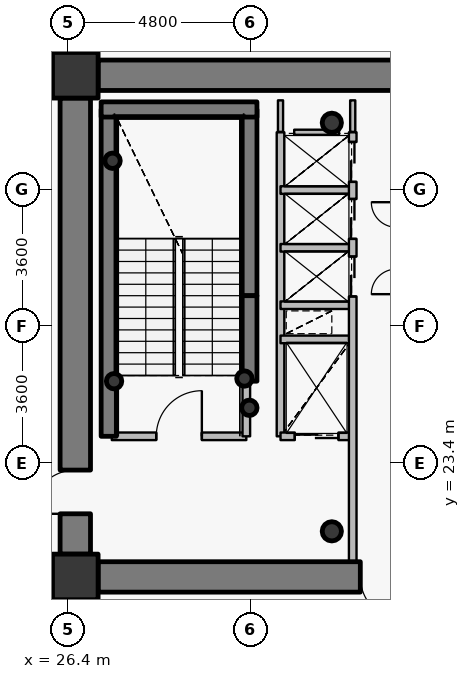
"""IFC4 building model, lengths in metres.
Left out: names, types, materials, properties, quantities, classifications, styles, units other than length and angle.
Written with IfcOpenShell. Run it as: python <this file> out.ifc"""

import sys

from ifc_helpers import new_model, si_unit, direction, frame, frame_2d, origin, origin_2d, place, context, subcontext, project, spatial, rectangle, hollow_circle, extrude, source, transform, mapped, element, fill, save


model = new_model("IFC4")
c1 = context("Model", 3, precision=1e-05, world=origin(), true_north=direction((0.0, 1.0)))
c2 = subcontext(c1, "Body", "Model", "MODEL_VIEW")
j1 = project(units=[si_unit("LENGTHUNIT", "METRE"), si_unit("PLANEANGLEUNIT", "RADIAN")], contexts=[c1])
p1 = place(None, origin())
s1 = spatial("IfcSite", under=j1, at=p1, CompositionType="ELEMENT")
p2 = place(p1, origin())
s2 = spatial("IfcBuilding", under=s1, at=p2, CompositionType="ELEMENT")
p3 = place(p2, frame((0.0, 0.0, 182.4)))
s3 = spatial("IfcBuildingStorey", under=s2, at=p3, CompositionType="ELEMENT", Elevation=182.4)
for number, where, z_axis, x_axis in (
    (1, (26.6, 20.4, 0.0), (0.0, 0.0, 1.0), (1.0, 0.0, 0.0)),
    (2, (26.6, 33.6, 0.0), (0.0, 0.0, 1.0), (1.0, 0.0, 0.0)),
):
    element("IfcColumn", number, at=place(p3, frame(where, z_axis=z_axis, x_axis=x_axis)), inside=s3, PredefinedType="COLUMN", context=c2, shape_type="SweptSolid", body=[
        extrude(rectangle(XDim=1.2, YDim=1.2, at=origin_2d()), origin(), (0.0, 0.0, 1.0), 3.75),
    ])
for number, where, z_axis, x_axis in (
    (3, (33.35, 21.6, 0.0), (0.0, 0.0, 1.0), (1.0, 0.0, 0.0)),
    (4, (33.35, 32.35, 0.0), (0.0, 0.0, 1.0), (1.0, 0.0, 0.0)),
):
    element("IfcColumn", number, at=place(p3, frame(where, z_axis=z_axis, x_axis=x_axis)), inside=s3, PredefinedType="COLUMN", context=c2, shape_type="SweptSolid", body=[
        extrude(hollow_circle(Radius=0.254, WallThickness=0.02, at=origin_2d()), origin(), (0.0, 0.0, 1.0), 3.75),
    ])
p4 = place(p3, frame((27.48, 24.1, 0.0), z_axis=(0.0, 0.0, 1.0), x_axis=(0.0, 1.0, 0.0)))
e5 = element("IfcWall", 5, at=p4, inside=s3, PredefinedType="SHEAR", context=c2, shape_type="SweptSolid", body=[
    extrude(rectangle(XDim=8.6, YDim=0.4, at=frame_2d((4.3, 0.0))), origin(), (0.0, 0.0, 1.0), 3.75),
])
p5 = place(p3, frame((31.18, 27.8, 0.0), z_axis=(0.0, 0.0, 1.0), x_axis=(0.0, 1.0, 0.0)))
e6 = element("IfcWall", 6, at=p5, inside=s3, PredefinedType="SHEAR", context=c2, shape_type="SweptSolid", body=[
    extrude(rectangle(XDim=4.9, YDim=0.4, at=frame_2d((2.45, 0.0))), origin(), (0.0, 0.0, 1.0), 3.75),
])
p6 = place(p3, frame((27.28, 32.7, 0.0), z_axis=(0.0, 0.0, 1.0), x_axis=(1.0, 0.0, 0.0)))
e7 = element("IfcWall", 7, at=p6, inside=s3, PredefinedType="SHEAR", context=c2, shape_type="SweptSolid", body=[
    extrude(rectangle(XDim=4.1, YDim=0.4, at=frame_2d((2.05, 0.0))), origin(), (0.0, 0.0, 1.0), 3.75),
])
for number, where, z_axis, x_axis in (
    (8, (27.58, 31.35, 0.0), (0.0, 0.0, 1.0), (1.0, 0.0, 0.0)),
    (9, (31.05, 25.62, 0.0), (0.0, 0.0, 1.0), (1.0, 0.0, 0.0)),
    (10, (31.18, 24.85, 0.0), (0.0, 0.0, 1.0), (1.0, 0.0, 0.0)),
    (11, (27.62, 25.55, 0.0), (0.0, 0.0, 1.0), (1.0, 0.0, 0.0)),
):
    element("IfcColumn", number, at=place(p3, frame(where, z_axis=z_axis, x_axis=x_axis)), inside=s3, PredefinedType="COLUMN", context=c2, shape_type="SweptSolid", body=[
        extrude(hollow_circle(Radius=0.203, WallThickness=0.016, at=origin_2d()), origin(), (0.0, 0.0, 1.0), 3.75),
    ])
p7 = place(p3, frame((27.2, 33.6, 0.0), z_axis=(0.0, 0.0, 1.0), x_axis=(1.0, 0.0, 0.0)))
e12 = element("IfcWall", 12, at=p7, inside=s3, PredefinedType="SHEAR", context=c2, shape_type="SweptSolid", body=[
    extrude(rectangle(XDim=17.6, YDim=0.8, at=frame_2d((8.8, 0.0))), origin(), (0.0, 0.0, 1.0), 2.95),
])
p8 = place(p7, frame((13.45, 0.0, 0.0)))
e13 = element("IfcOpeningElement", 13, at=p8, cuts=e12, PredefinedType="OPENING", context=c2, shape_type="SweptSolid", body=[
    extrude(rectangle(XDim=1.15, YDim=2.15, at=origin_2d()), frame((0.575, 0.41, 1.075), z_axis=(0.0, -1.0, 0.0), x_axis=(1.0, 0.0, 0.0)), (0.0, 0.0, 1.0), 0.82),
])
p9 = place(p3, frame((44.8, 20.4, 0.0), z_axis=(0.0, 0.0, 1.0), x_axis=(-1.0, 0.0, 0.0)))
e14 = element("IfcWall", 14, at=p9, inside=s3, PredefinedType="SHEAR", context=c2, shape_type="SweptSolid", body=[
    extrude(rectangle(XDim=17.6, YDim=0.8, at=frame_2d((8.8, 0.0))), origin(), (0.0, 0.0, 1.0), 2.95),
])
p10 = place(p9, frame((9.55, 0.0, 0.0)))
e15 = element("IfcOpeningElement", 15, at=p10, cuts=e14, PredefinedType="OPENING", context=c2, shape_type="SweptSolid", body=[
    extrude(rectangle(XDim=1.15, YDim=2.15, at=origin_2d()), frame((0.575, 0.41, 1.075), z_axis=(0.0, -1.0, 0.0), x_axis=(1.0, 0.0, 0.0)), (0.0, 0.0, 1.0), 0.82),
])
p11 = place(p3, frame((26.6, 21.0, 0.0), z_axis=(0.0, 0.0, 1.0), x_axis=(0.0, 1.0, 0.0)))
e16 = element("IfcWall", 16, at=p11, inside=s3, PredefinedType="SHEAR", context=c2, shape_type="SweptSolid", body=[
    extrude(rectangle(XDim=12.0, YDim=0.8, at=frame_2d((6.0, 0.0))), origin(), (0.0, 0.0, 1.0), 2.95),
])
p12 = place(p11, frame((1.061, 0.0, 0.0)))
e17 = element("IfcOpeningElement", 17, at=p12, cuts=e16, PredefinedType="OPENING", context=c2, shape_type="SweptSolid", body=[
    extrude(rectangle(XDim=1.15, YDim=2.15, at=origin_2d()), frame((0.575, 0.41, 1.075), z_axis=(0.0, -1.0, 0.0), x_axis=(1.0, 0.0, 0.0)), (0.0, 0.0, 1.0), 0.82),
])
p13 = place(p3, frame((31.18, 25.55, 0.0), z_axis=(0.0, 0.0, 1.0), x_axis=(0.0, 1.0, 0.0)))
e18 = element("IfcWall", 18, at=p13, inside=s3, PredefinedType="SHEAR", context=c2, shape_type="SweptSolid", body=[
    extrude(rectangle(XDim=2.25, YDim=0.4, at=frame_2d((1.125, 0.0))), origin(), (0.0, 0.0, 1.0), 3.1),
])
p14 = place(p3, frame((27.56, 24.1, 0.0), z_axis=(0.0, 0.0, 1.0), x_axis=(1.0, 0.0, 0.0)))
e19 = element("IfcWall", 19, at=p14, inside=s3, PredefinedType="PARTITIONING", context=c2, shape_type="SweptSolid", body=[
    extrude(rectangle(XDim=3.54, YDim=0.2, at=frame_2d((1.77, 0.0))), origin(), (0.0, 0.0, 1.0), 3.5),
])
p15 = place(p14, frame((1.17, 0.0, 0.0)))
e20 = element("IfcOpeningElement", 20, at=p15, cuts=e19, PredefinedType="OPENING", context=c2, shape_type="SweptSolid", body=[
    extrude(rectangle(XDim=1.2, YDim=2.15, at=origin_2d()), frame((0.6, 0.11, 1.075), z_axis=(0.0, -1.0, 0.0), x_axis=(1.0, 0.0, 0.0)), (0.0, 0.0, 1.0), 0.22),
])
p16 = place(p3, frame((31.1, 24.1, 0.0), z_axis=(0.0, 0.0, 1.0), x_axis=(0.0, 1.0, 0.0)))
e21 = element("IfcWall", 21, at=p16, inside=s3, PredefinedType="PARTITIONING", context=c2, shape_type="SweptSolid", body=[
    extrude(rectangle(XDim=1.44, YDim=0.2, at=frame_2d((0.72, 0.0))), origin(), (0.0, 0.0, 1.0), 3.5),
])
p17 = place(p3, frame((32.0, 24.1, 0.0), z_axis=(0.0, 0.0, 1.0), x_axis=(0.0, 1.0, 0.0)))
e22 = element("IfcWall", 22, at=p17, inside=s3, PredefinedType="PARTITIONING", context=c2, shape_type="SweptSolid", body=[
    extrude(rectangle(XDim=8.0, YDim=0.2, at=frame_2d((4.0, 0.0))), origin(), (0.0, 0.0, 1.0), 3.5),
])
p18 = place(p3, frame((32.0, 24.1, 0.0), z_axis=(0.0, 0.0, 1.0), x_axis=(1.0, 0.0, 0.0)))
e23 = element("IfcWall", 23, at=p18, inside=s3, PredefinedType="PARTITIONING", context=c2, shape_type="SweptSolid", body=[
    extrude(rectangle(XDim=1.9, YDim=0.2, at=frame_2d((0.95, 0.0))), origin(), (0.0, 0.0, 1.0), 3.085),
])
p19 = place(p18, frame((0.375, 0.0, 0.0)))
e24 = element("IfcOpeningElement", 24, at=p19, cuts=e23, PredefinedType="OPENING", context=c2, shape_type="SweptSolid", body=[
    extrude(rectangle(XDim=1.15, YDim=2.15, at=origin_2d()), frame((0.575, 0.11, 1.075), z_axis=(0.0, -1.0, 0.0), x_axis=(1.0, 0.0, 0.0)), (0.0, 0.0, 1.0), 0.22),
])
for number, where, z_axis, x_axis in (
    (25, (32.0, 26.65, 0.0), (0.0, 0.0, 1.0), (1.0, 0.0, 0.0)),
    (26, (32.0, 27.55, 0.0), (0.0, 0.0, 1.0), (1.0, 0.0, 0.0)),
    (27, (32.0, 29.06, 0.0), (0.0, 0.0, 1.0), (1.0, 0.0, 0.0)),
    (28, (32.0, 30.58, 0.0), (0.0, 0.0, 1.0), (1.0, 0.0, 0.0)),
):
    element("IfcWall", number, at=place(p3, frame(where, z_axis=z_axis, x_axis=x_axis)), inside=s3, PredefinedType="PARTITIONING", context=c2, shape_type="SweptSolid", body=[
        extrude(rectangle(XDim=1.9, YDim=0.2, at=frame_2d((0.95, 0.0))), origin(), (0.0, 0.0, 1.0), 3.085),
    ])
p20 = place(p3, frame((33.9, 20.8, 0.0), z_axis=(0.0, 0.0, 1.0), x_axis=(0.0, 1.0, 0.0)))
e29 = element("IfcWall", 29, at=p20, inside=s3, PredefinedType="PARTITIONING", context=c2, shape_type="SweptSolid", body=[
    extrude(rectangle(XDim=11.3, YDim=0.2, at=frame_2d((5.65, 0.0))), origin(), (0.0, 0.0, 1.0), 3.085),
])
p21 = place(p20, frame((6.98, 0.0, 0.0)))
e30 = element("IfcOpeningElement", 30, at=p21, cuts=e29, PredefinedType="OPENING", context=c2, shape_type="SweptSolid", body=[
    extrude(rectangle(XDim=1.05, YDim=2.15, at=origin_2d()), frame((0.525, 0.11, 1.075), z_axis=(0.0, -1.0, 0.0), x_axis=(1.0, 0.0, 0.0)), (0.0, 0.0, 1.0), 0.22),
])
p22 = place(p20, frame((8.495, 0.0, 0.0)))
e31 = element("IfcOpeningElement", 31, at=p22, cuts=e29, PredefinedType="OPENING", context=c2, shape_type="SweptSolid", body=[
    extrude(rectangle(XDim=1.05, YDim=2.15, at=origin_2d()), frame((0.525, 0.11, 1.075), z_axis=(0.0, -1.0, 0.0), x_axis=(1.0, 0.0, 0.0)), (0.0, 0.0, 1.0), 0.22),
])
p23 = place(p20, frame((9.995, 0.0, 0.0)))
e32 = element("IfcOpeningElement", 32, at=p23, cuts=e29, PredefinedType="OPENING", context=c2, shape_type="SweptSolid", body=[
    extrude(rectangle(XDim=1.05, YDim=2.15, at=origin_2d()), frame((0.525, 0.11, 1.075), z_axis=(0.0, -1.0, 0.0), x_axis=(1.0, 0.0, 0.0)), (0.0, 0.0, 1.0), 0.22),
])
p24 = place(p3, frame((32.36, 32.1, 0.0), z_axis=(0.0, 0.0, 1.0), x_axis=(1.0, 0.0, 0.0)))
e33 = element("IfcWall", 33, at=p24, inside=s3, PredefinedType="PARTITIONING", context=c2, shape_type="SweptSolid", body=[
    extrude(rectangle(XDim=1.18, YDim=0.135, at=frame_2d((0.59, 0.0))), origin(), (0.0, 0.0, 1.0), 3.085),
])
p25 = place(p3, frame((32.0, 32.94, 0.0), z_axis=(0.0, 0.0, 1.0), x_axis=(0.0, -1.0, 0.0)))
e34 = element("IfcWall", 34, at=p25, inside=s3, PredefinedType="PARTITIONING", context=c2, shape_type="SweptSolid", body=[
    extrude(rectangle(XDim=0.83, YDim=0.135, at=frame_2d((0.415, 0.0))), origin(), (0.0, 0.0, 1.0), 3.035),
])
p26 = place(p3, frame((33.9, 32.11, 0.0), z_axis=(0.0, 0.0, 1.0), x_axis=(0.0, 1.0, 0.0)))
e35 = element("IfcWall", 35, at=p26, inside=s3, PredefinedType="PARTITIONING", context=c2, shape_type="SweptSolid", body=[
    extrude(rectangle(XDim=0.83, YDim=0.135, at=frame_2d((0.415, 0.0))), origin(), (0.0, 0.0, 1.0), 3.085),
])
p27 = place(p3, frame((27.19, 34.0, 0.0), z_axis=(0.0, 0.0, 1.0), x_axis=(-1.0, 0.0, 0.0)))
e36 = element("IfcWall", 36, at=p27, inside=s3, PredefinedType="PARTITIONING", context=c2, shape_type="SweptSolid", body=[
    extrude(rectangle(XDim=0.99, YDim=0.135, at=frame_2d((0.495, 0.0))), origin(), (0.0, 0.0, 1.0), 2.935),
])
p28 = place(p3, frame((26.2, 33.692, 0.0), z_axis=(0.0, 0.0, 1.0), x_axis=(0.0, -1.0, 0.0)))
e37 = element("IfcWall", 37, at=p28, inside=s3, PredefinedType="PARTITIONING", context=c2, shape_type="SweptSolid", body=[
    extrude(rectangle(XDim=0.682, YDim=0.135, at=frame_2d((0.341, 0.0))), origin(), (0.0, 0.0, 1.0), 3.5),
])
p29 = place(p3, frame((26.2, 20.99, 0.0), z_axis=(0.0, 0.0, 1.0), x_axis=(0.0, -1.0, 0.0)))
e38 = element("IfcWall", 38, at=p29, inside=s3, PredefinedType="PARTITIONING", context=c2, shape_type="SweptSolid", body=[
    extrude(rectangle(XDim=0.99, YDim=0.135, at=frame_2d((0.495, 0.0))), origin(), (0.0, 0.0, 1.0), 3.5),
])
p30 = place(p3, frame((26.508, 20.0, 0.0), z_axis=(0.0, 0.0, 1.0), x_axis=(1.0, 0.0, 0.0)))
e39 = element("IfcWall", 39, at=p30, inside=s3, PredefinedType="PARTITIONING", context=c2, shape_type="SweptSolid", body=[
    extrude(rectangle(XDim=0.682, YDim=0.135, at=frame_2d((0.341, 0.0))), origin(), (0.0, 0.0, 1.0), 2.935),
])
m1 = source(origin(), c2, "Body", "SweptSolid", [
    extrude(rectangle(XDim=1.15, YDim=2.15, at=origin_2d()), frame((0.575, 0.025, 1.075), z_axis=(0.0, -1.0, 0.0), x_axis=(1.0, 0.0, 0.0)), (0.0, 0.0, 1.0), 0.05),
])
p31 = place(p12, origin())
e40 = element("IfcDoor", 40, at=p31, inside=s3, OperationType="SINGLE_SWING_LEFT", PredefinedType="DOOR", context=c2, shape_type="MappedRepresentation", body=[
    mapped(m1, transform((0.0, 0.0, 0.0), x_axis=(1.0, 0.0, 0.0), y_axis=(0.0, 1.0, 0.0), z_axis=(0.0, 0.0, 1.0), scale=1.0)),
])
fill(e17, e40)
p32 = place(p10, origin())
e41 = element("IfcDoor", 41, at=p32, inside=s3, OperationType="SINGLE_SWING_LEFT", PredefinedType="DOOR", context=c2, shape_type="MappedRepresentation", body=[
    mapped(m1, transform((0.0, 0.0, 0.0), x_axis=(1.0, 0.0, 0.0), y_axis=(0.0, 1.0, 0.0), z_axis=(0.0, 0.0, 1.0), scale=1.0)),
])
fill(e15, e41)
m2 = source(origin(), c2, "Body", "SweptSolid", [
    extrude(rectangle(XDim=1.2, YDim=2.15, at=origin_2d()), frame((0.6, 0.025, 1.075), z_axis=(0.0, -1.0, 0.0), x_axis=(1.0, 0.0, 0.0)), (0.0, 0.0, 1.0), 0.05),
])
p33 = place(p15, origin())
e42 = element("IfcDoor", 42, at=p33, inside=s3, OperationType="SINGLE_SWING_RIGHT", PredefinedType="DOOR", context=c2, shape_type="MappedRepresentation", body=[
    mapped(m2, transform((0.0, 0.0, 0.0), x_axis=(1.0, 0.0, 0.0), y_axis=(0.0, 1.0, 0.0), z_axis=(0.0, 0.0, 1.0), scale=1.0)),
])
fill(e20, e42)
m3 = source(origin(), c2, "Body", "SweptSolid", [
    extrude(rectangle(XDim=1.15, YDim=2.15, at=origin_2d()), frame((0.575, 0.025, 1.075), z_axis=(0.0, -1.0, 0.0), x_axis=(1.0, 0.0, 0.0)), (0.0, 0.0, 1.0), 0.05),
])
p34 = place(p19, origin())
e43 = element("IfcDoor", 43, at=p34, inside=s3, OperationType="DOUBLE_DOOR_SLIDING", PredefinedType="USERDEFINED", context=c2, shape_type="MappedRepresentation", body=[
    mapped(m3, transform((0.0, 0.0, 0.0), x_axis=(1.0, 0.0, 0.0), y_axis=(0.0, 1.0, 0.0), z_axis=(0.0, 0.0, 1.0), scale=1.0)),
])
fill(e24, e43)
m4 = source(origin(), c2, "Body", "SweptSolid", [
    extrude(rectangle(XDim=1.05, YDim=2.15, at=origin_2d()), frame((0.525, 0.025, 1.075), z_axis=(0.0, -1.0, 0.0), x_axis=(1.0, 0.0, 0.0)), (0.0, 0.0, 1.0), 0.05),
])
p35 = place(p21, origin())
e44 = element("IfcDoor", 44, at=p35, inside=s3, OperationType="DOUBLE_DOOR_SLIDING", PredefinedType="USERDEFINED", context=c2, shape_type="MappedRepresentation", body=[
    mapped(m4, transform((0.0, 0.0, 0.0), x_axis=(1.0, 0.0, 0.0), y_axis=(0.0, 1.0, 0.0), z_axis=(0.0, 0.0, 1.0), scale=1.0)),
])
fill(e30, e44)
p36 = place(p22, origin())
e45 = element("IfcDoor", 45, at=p36, inside=s3, OperationType="DOUBLE_DOOR_SLIDING", PredefinedType="USERDEFINED", context=c2, shape_type="MappedRepresentation", body=[
    mapped(m4, transform((0.0, 0.0, 0.0), x_axis=(1.0, 0.0, 0.0), y_axis=(0.0, 1.0, 0.0), z_axis=(0.0, 0.0, 1.0), scale=1.0)),
])
fill(e31, e45)
p37 = place(p23, origin())
e46 = element("IfcDoor", 46, at=p37, inside=s3, OperationType="DOUBLE_DOOR_SLIDING", PredefinedType="USERDEFINED", context=c2, shape_type="MappedRepresentation", body=[
    mapped(m4, transform((0.0, 0.0, 0.0), x_axis=(1.0, 0.0, 0.0), y_axis=(0.0, 1.0, 0.0), z_axis=(0.0, 0.0, 1.0), scale=1.0)),
])
fill(e32, e46)
save(model, sys.argv[1])
